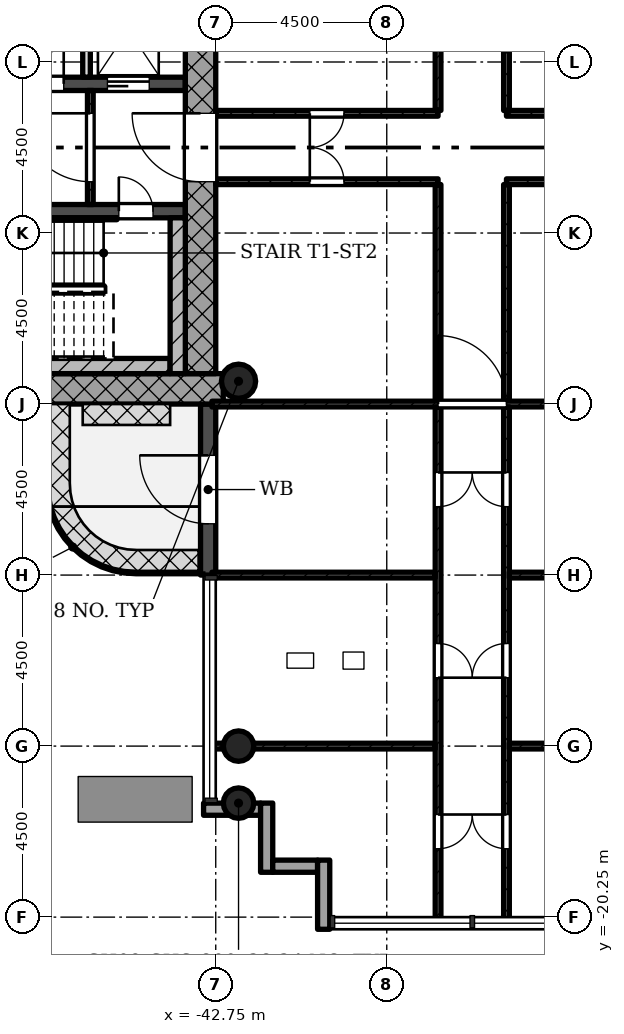
"""IFC4 building model, lengths in metres.
Left out: names, types, materials, properties, quantities, classifications, styles, units other than length and angle.
Written with IfcOpenShell. Run it as: python <this file> out.ifc"""

import sys

from ifc_helpers import new_model, si_unit, direction, frame, frame_2d, origin, origin_2d, place, context, subcontext, project, spatial, rectangle, hollow_circle, extrude, element, fill, save


model = new_model("IFC4")
c1 = context("Model", 3, precision=1e-05, world=origin(), true_north=direction((0.0, 1.0)))
c2 = subcontext(c1, "Body", "Model", "MODEL_VIEW")
j1 = project(units=[si_unit("LENGTHUNIT", "METRE"), si_unit("PLANEANGLEUNIT", "RADIAN")], contexts=[c1])
p1 = place(None, origin())
s1 = spatial("IfcSite", under=j1, at=p1, CompositionType="ELEMENT")
p2 = place(p1, origin())
s2 = spatial("IfcBuilding", under=s1, at=p2, CompositionType="ELEMENT")
p3 = place(p2, frame((0.0, 0.0, 181.3)))
s3 = spatial("IfcBuildingStorey", under=s2, at=p3, CompositionType="ELEMENT", Elevation=181.3)
p4 = place(p3, frame((-50.95, -6.35, 0.0), z_axis=(0.0, 0.0, 1.0), x_axis=(1.0, 0.0, 0.0)))
e1 = element("IfcWall", 1, at=p4, inside=s3, PredefinedType="SHEAR", context=c2, shape_type="SweptSolid", body=[
    extrude(rectangle(XDim=8.398, YDim=0.8, at=frame_2d((4.199, 0.0))), origin(), (0.0, 0.0, 1.0), 4.5),
])
p5 = place(p3, frame((-43.15, -5.95, 0.0), z_axis=(0.0, 0.0, 1.0), x_axis=(0.0, 1.0, 0.0)))
e2 = element("IfcWall", 2, at=p5, inside=s3, PredefinedType="SHEAR", context=c2, shape_type="SweptSolid", body=[
    extrude(rectangle(XDim=12.7, YDim=0.8, at=frame_2d((6.35, 0.0))), origin(), (0.0, 0.0, 1.0), 4.5),
])
p6 = place(p5, frame((5.05, 0.0, 0.0)))
e3 = element("IfcOpeningElement", 3, at=p6, cuts=e2, PredefinedType="OPENING", context=c2, shape_type="SweptSolid", body=[
    extrude(rectangle(XDim=1.8, YDim=2.1, at=frame_2d((0.9, 1.05))), frame((0.0, 0.41, 0.0), z_axis=(0.0, -1.0, 0.0), x_axis=(1.0, 0.0, 0.0)), (0.0, 0.0, 1.0), 0.82),
])
p7 = place(p3, frame((-50.95, -1.675, 0.0), z_axis=(0.0, 0.0, 1.0), x_axis=(1.0, 0.0, 0.0)))
e4 = element("IfcWall", 4, at=p7, inside=s3, PredefinedType="SHEAR", context=c2, shape_type="SweptSolid", body=[
    extrude(rectangle(XDim=7.4, YDim=0.35, at=frame_2d((3.7, 0.0))), origin(), (0.0, 0.0, 1.0), 4.5),
])
p8 = place(p7, frame((5.65, 0.0, 0.0)))
e5 = element("IfcOpeningElement", 5, at=p8, cuts=e4, PredefinedType="OPENING", context=c2, shape_type="SweptSolid", body=[
    extrude(rectangle(XDim=0.9, YDim=2.1, at=frame_2d((0.45, 1.05))), frame((0.0, 0.185, 0.0), z_axis=(0.0, -1.0, 0.0), x_axis=(1.0, 0.0, 0.0)), (0.0, 0.0, 1.0), 0.37),
])
p9 = place(p3, frame((-50.95, 1.675, 0.0), z_axis=(0.0, 0.0, 1.0), x_axis=(1.0, 0.0, 0.0)))
e6 = element("IfcWall", 6, at=p9, inside=s3, PredefinedType="SHEAR", context=c2, shape_type="SweptSolid", body=[
    extrude(rectangle(XDim=7.4, YDim=0.35, at=frame_2d((3.7, 0.0))), origin(), (0.0, 0.0, 1.0), 4.5),
])
p10 = place(p9, frame((5.35, 0.0, 0.0)))
e7 = element("IfcOpeningElement", 7, at=p10, cuts=e6, PredefinedType="OPENING", context=c2, shape_type="SweptSolid", body=[
    extrude(rectangle(XDim=1.1, YDim=2.1, at=frame_2d((0.55, 1.05))), frame((0.0, 0.185, 0.0), z_axis=(0.0, -1.0, 0.0), x_axis=(1.0, 0.0, 0.0)), (0.0, 0.0, 1.0), 0.37),
])
p11 = place(p9, frame((1.0, 0.0, 0.0)))
e8 = element("IfcOpeningElement", 8, at=p11, cuts=e6, PredefinedType="OPENING", context=c2, shape_type="SweptSolid", body=[
    extrude(rectangle(XDim=1.1, YDim=2.1, at=frame_2d((0.55, 1.05))), frame((0.0, 0.185, 0.0), z_axis=(0.0, -1.0, 0.0), x_axis=(1.0, 0.0, 0.0)), (0.0, 0.0, 1.0), 0.37),
])
p12 = place(p9, frame((3.3, 0.0, 0.0)))
e9 = element("IfcOpeningElement", 9, at=p12, cuts=e6, PredefinedType="OPENING", context=c2, shape_type="SweptSolid", body=[
    extrude(rectangle(XDim=0.9, YDim=2.1, at=frame_2d((0.45, 1.05))), frame((0.0, 0.185, 0.0), z_axis=(0.0, -1.0, 0.0), x_axis=(1.0, 0.0, 0.0)), (0.0, 0.0, 1.0), 0.37),
])
for number, where, z_axis, x_axis in (
    (10, (-42.15, -15.75, 0.0), (0.0, 0.0, 1.0), (1.0, 0.0, 0.0)),
    (11, (-42.15, -17.25, 0.0), (0.0, 0.0, 1.0), (1.0, 0.0, 0.0)),
):
    element("IfcColumn", number, at=place(p3, frame(where, z_axis=z_axis, x_axis=x_axis)), inside=s3, PredefinedType="COLUMN", context=c2, shape_type="SweptSolid", body=[
        extrude(hollow_circle(Radius=0.4, WallThickness=0.028, at=origin_2d()), origin(), (0.0, 0.0, 1.0), 4.5),
    ])
p13 = place(p3, frame((-42.15, -6.15, 0.0), z_axis=(0.0, 0.0, 1.0), x_axis=(1.0, 0.0, 0.0)))
e12 = element("IfcColumn", 12, at=p13, inside=s3, PredefinedType="COLUMN", context=c2, shape_type="SweptSolid", body=[
    extrude(hollow_circle(Radius=0.45, WallThickness=0.032, at=origin_2d()), origin(), (0.0, 0.0, 1.0), 4.5),
])
p14 = place(p3, frame((-42.95, -6.75, -0.02), z_axis=(0.0, 0.0, 1.0), x_axis=(0.0, -1.0, 0.0)))
e13 = element("IfcWall", 13, at=p14, inside=s3, PredefinedType="STANDARD", context=c2, shape_type="SweptSolid", body=[
    extrude(rectangle(XDim=4.5, YDim=0.4, at=frame_2d((2.25, 0.0))), origin(), (0.0, 0.0, 1.0), 4.22),
])
p15 = place(p14, frame((1.35, 0.0, 0.02)))
e14 = element("IfcOpeningElement", 14, at=p15, cuts=e13, PredefinedType="OPENING", context=c2, shape_type="SweptSolid", body=[
    extrude(rectangle(XDim=1.8, YDim=2.1, at=frame_2d((0.9, 1.05))), frame((0.0, 0.21, 0.0), z_axis=(0.0, -1.0, 0.0), x_axis=(1.0, 0.0, 0.0)), (0.0, 0.0, 1.0), 0.42),
])
p16 = place(p3, frame((-43.07, -17.41, -0.3), z_axis=(0.0, 0.0, 1.0), x_axis=(1.0, 0.0, 0.0)))
e15 = element("IfcWall", 15, at=p16, inside=s3, PredefinedType="STANDARD", context=c2, shape_type="SweptSolid", body=[
    extrude(rectangle(XDim=1.5, YDim=0.32, at=frame_2d((0.75, 0.0))), origin(), (0.0, 0.0, 1.0), 4.5),
])
p17 = place(p3, frame((-41.41, -17.25, -0.3), z_axis=(0.0, 0.0, 1.0), x_axis=(0.0, -1.0, 0.0)))
e16 = element("IfcWall", 16, at=p17, inside=s3, PredefinedType="STANDARD", context=c2, shape_type="SweptSolid", body=[
    extrude(rectangle(XDim=1.82, YDim=0.32, at=frame_2d((0.91, 0.0))), origin(), (0.0, 0.0, 1.0), 4.5),
])
p18 = place(p3, frame((-41.25, -18.91, -0.3), z_axis=(0.0, 0.0, 1.0), x_axis=(1.0, 0.0, 0.0)))
e17 = element("IfcWall", 17, at=p18, inside=s3, PredefinedType="STANDARD", context=c2, shape_type="SweptSolid", body=[
    extrude(rectangle(XDim=1.18, YDim=0.32, at=frame_2d((0.59, 0.0))), origin(), (0.0, 0.0, 1.0), 4.5),
])
p19 = place(p3, frame((-39.91, -18.75, -0.3), z_axis=(0.0, 0.0, 1.0), x_axis=(0.0, -1.0, 0.0)))
e18 = element("IfcWall", 18, at=p19, inside=s3, PredefinedType="STANDARD", context=c2, shape_type="SweptSolid", body=[
    extrude(rectangle(XDim=1.82, YDim=0.32, at=frame_2d((0.91, 0.0))), origin(), (0.0, 0.0, 1.0), 4.5),
])
p20 = place(p3, frame((-46.05, 1.5, 0.0), z_axis=(0.0, 0.0, 1.0), x_axis=(0.0, -1.0, 0.0)))
e19 = element("IfcWall", 19, at=p20, inside=s3, PredefinedType="PARTITIONING", context=c2, shape_type="SweptSolid", body=[
    extrude(rectangle(XDim=3.0, YDim=0.15, at=frame_2d((1.5, 0.0))), origin(), (0.0, 0.0, 1.0), 4.08),
])
p21 = place(p20, frame((0.6, 0.0, 0.0)))
e20 = element("IfcOpeningElement", 20, at=p21, cuts=e19, PredefinedType="OPENING", context=c2, shape_type="SweptSolid", body=[
    extrude(rectangle(XDim=1.8, YDim=2.1, at=frame_2d((0.9, 1.05))), frame((0.0, 0.085, 0.0), z_axis=(0.0, -1.0, 0.0), x_axis=(1.0, 0.0, 0.0)), (0.0, 0.0, 1.0), 0.17),
])
p22 = place(p3, frame((-46.15, 5.95, 0.0), z_axis=(0.0, 0.0, 1.0), x_axis=(0.0, -1.0, 0.0)))
e21 = element("IfcWall", 21, at=p22, inside=s3, PredefinedType="SOLIDWALL", context=c2, shape_type="SweptSolid", body=[
    extrude(rectangle(XDim=4.1, YDim=0.2, at=frame_2d((2.05, 0.0))), origin(), (0.0, 0.0, 1.0), 4.08),
])
p23 = place(p3, frame((-35.1, 0.9, 0.0), z_axis=(0.0, 0.0, 1.0), x_axis=(1.0, 0.0, 0.0)))
e22 = element("IfcWall", 22, at=p23, inside=s3, PredefinedType="PARTITIONING", context=c2, shape_type="SweptSolid", body=[
    extrude(rectangle(XDim=5.85, YDim=0.15, at=frame_2d((2.925, 0.0))), origin(), (0.0, 0.0, 1.0), 4.08),
])
p24 = place(p23, frame((2.475, 0.0, 0.0)))
e23 = element("IfcOpeningElement", 23, at=p24, cuts=e22, PredefinedType="OPENING", context=c2, shape_type="SweptSolid", body=[
    extrude(rectangle(XDim=0.9, YDim=2.1, at=frame_2d((0.45, 1.05))), frame((0.0, 0.085, 0.0), z_axis=(0.0, -1.0, 0.0), x_axis=(1.0, 0.0, 0.0)), (0.0, 0.0, 1.0), 0.17),
])
p25 = place(p3, frame((-35.1, 0.975, 0.0), z_axis=(0.0, 0.0, 1.0), x_axis=(0.0, 1.0, 0.0)))
e24 = element("IfcWall", 24, at=p25, inside=s3, PredefinedType="PARTITIONING", context=c2, shape_type="SweptSolid", body=[
    extrude(rectangle(XDim=5.7, YDim=0.15, at=frame_2d((2.85, 0.0))), origin(), (0.0, 0.0, 1.0), 4.08),
])
p26 = place(p3, frame((-35.1, -0.9, 0.0), z_axis=(0.0, 0.0, 1.0), x_axis=(1.0, 0.0, 0.0)))
e25 = element("IfcWall", 25, at=p26, inside=s3, PredefinedType="PARTITIONING", context=c2, shape_type="SweptSolid", body=[
    extrude(rectangle(XDim=5.85, YDim=0.15, at=frame_2d((2.925, 0.0))), origin(), (0.0, 0.0, 1.0), 4.08),
])
p27 = place(p26, frame((2.475, 0.0, 0.0)))
e26 = element("IfcOpeningElement", 26, at=p27, cuts=e25, PredefinedType="OPENING", context=c2, shape_type="SweptSolid", body=[
    extrude(rectangle(XDim=0.9, YDim=2.1, at=frame_2d((0.45, 1.05))), frame((0.0, 0.085, 0.0), z_axis=(0.0, -1.0, 0.0), x_axis=(1.0, 0.0, 0.0)), (0.0, 0.0, 1.0), 0.17),
])
p28 = place(p3, frame((-35.1, -6.675, 0.0), z_axis=(0.0, 0.0, 1.0), x_axis=(0.0, 1.0, 0.0)))
e27 = element("IfcWall", 27, at=p28, inside=s3, PredefinedType="PARTITIONING", context=c2, shape_type="SweptSolid", body=[
    extrude(rectangle(XDim=5.7, YDim=0.15, at=frame_2d((2.85, 0.0))), origin(), (0.0, 0.0, 1.0), 4.08),
])
p29 = place(p3, frame((-42.75, 0.9, 0.0), z_axis=(0.0, 0.0, 1.0), x_axis=(1.0, 0.0, 0.0)))
e28 = element("IfcWall", 28, at=p29, inside=s3, PredefinedType="PARTITIONING", context=c2, shape_type="SweptSolid", body=[
    extrude(rectangle(XDim=5.85, YDim=0.15, at=frame_2d((2.925, 0.0))), origin(), (0.0, 0.0, 1.0), 4.08),
])
p30 = place(p29, frame((2.475, 0.0, 0.0)))
e29 = element("IfcOpeningElement", 29, at=p30, cuts=e28, PredefinedType="OPENING", context=c2, shape_type="SweptSolid", body=[
    extrude(rectangle(XDim=0.9, YDim=2.1, at=frame_2d((0.45, 1.05))), frame((0.0, 0.085, 0.0), z_axis=(0.0, -1.0, 0.0), x_axis=(1.0, 0.0, 0.0)), (0.0, 0.0, 1.0), 0.17),
])
p31 = place(p3, frame((-36.9, 0.975, 0.0), z_axis=(0.0, 0.0, 1.0), x_axis=(0.0, 1.0, 0.0)))
e30 = element("IfcWall", 30, at=p31, inside=s3, PredefinedType="PARTITIONING", context=c2, shape_type="SweptSolid", body=[
    extrude(rectangle(XDim=5.7, YDim=0.15, at=frame_2d((2.85, 0.0))), origin(), (0.0, 0.0, 1.0), 4.08),
])
p32 = place(p3, frame((-42.75, -0.9, 0.0), z_axis=(0.0, 0.0, 1.0), x_axis=(1.0, 0.0, 0.0)))
e31 = element("IfcWall", 31, at=p32, inside=s3, PredefinedType="PARTITIONING", context=c2, shape_type="SweptSolid", body=[
    extrude(rectangle(XDim=5.85, YDim=0.15, at=frame_2d((2.925, 0.0))), origin(), (0.0, 0.0, 1.0), 4.08),
])
p33 = place(p32, frame((2.475, 0.0, 0.0)))
e32 = element("IfcOpeningElement", 32, at=p33, cuts=e31, PredefinedType="OPENING", context=c2, shape_type="SweptSolid", body=[
    extrude(rectangle(XDim=0.9, YDim=2.1, at=frame_2d((0.45, 1.05))), frame((0.0, 0.085, 0.0), z_axis=(0.0, -1.0, 0.0), x_axis=(1.0, 0.0, 0.0)), (0.0, 0.0, 1.0), 0.17),
])
p34 = place(p3, frame((-36.9, -6.675, 0.0), z_axis=(0.0, 0.0, 1.0), x_axis=(0.0, 1.0, 0.0)))
e33 = element("IfcWall", 33, at=p34, inside=s3, PredefinedType="PARTITIONING", context=c2, shape_type="SweptSolid", body=[
    extrude(rectangle(XDim=5.7, YDim=0.15, at=frame_2d((2.85, 0.0))), origin(), (0.0, 0.0, 1.0), 4.08),
])
p35 = place(p3, frame((-42.85, -6.75, 0.0), z_axis=(0.0, 0.0, 1.0), x_axis=(1.0, 0.0, 0.0)))
e34 = element("IfcWall", 34, at=p35, inside=s3, PredefinedType="PARTITIONING", context=c2, shape_type="SweptSolid", body=[
    extrude(rectangle(XDim=13.7, YDim=0.15, at=frame_2d((6.85, 0.0))), origin(), (0.0, 0.0, 1.0), 4.08),
])
p36 = place(p35, frame((5.95, 0.0, 0.0)))
e35 = element("IfcOpeningElement", 35, at=p36, cuts=e34, PredefinedType="OPENING", context=c2, shape_type="SweptSolid", body=[
    extrude(rectangle(XDim=1.8, YDim=2.1, at=frame_2d((0.9, 1.05))), frame((0.0, 0.085, 0.0), z_axis=(0.0, -1.0, 0.0), x_axis=(1.0, 0.0, 0.0)), (0.0, 0.0, 1.0), 0.17),
])
p37 = place(p3, frame((-35.1, -20.35, 0.0), z_axis=(0.0, 0.0, 1.0), x_axis=(0.0, 1.0, 0.0)))
e36 = element("IfcWall", 36, at=p37, inside=s3, PredefinedType="PARTITIONING", context=c2, shape_type="SweptSolid", body=[
    extrude(rectangle(XDim=13.525, YDim=0.15, at=frame_2d((6.763, 0.0))), origin(), (0.0, 0.0, 1.0), 4.08),
])
p38 = place(p37, frame((1.9, 0.0, 0.0)))
e37 = element("IfcOpeningElement", 37, at=p38, cuts=e36, PredefinedType="OPENING", context=c2, shape_type="SweptSolid", body=[
    extrude(rectangle(XDim=0.9, YDim=2.1, at=frame_2d((0.45, 1.05))), frame((0.0, 0.085, 0.0), z_axis=(0.0, -1.0, 0.0), x_axis=(1.0, 0.0, 0.0)), (0.0, 0.0, 1.0), 0.17),
])
p39 = place(p37, frame((6.4, 0.0, 0.0)))
e38 = element("IfcOpeningElement", 38, at=p39, cuts=e36, PredefinedType="OPENING", context=c2, shape_type="SweptSolid", body=[
    extrude(rectangle(XDim=0.9, YDim=2.1, at=frame_2d((0.45, 1.05))), frame((0.0, 0.085, 0.0), z_axis=(0.0, -1.0, 0.0), x_axis=(1.0, 0.0, 0.0)), (0.0, 0.0, 1.0), 0.17),
])
p40 = place(p37, frame((10.9, 0.0, 0.0)))
e39 = element("IfcOpeningElement", 39, at=p40, cuts=e36, PredefinedType="OPENING", context=c2, shape_type="SweptSolid", body=[
    extrude(rectangle(XDim=0.9, YDim=2.1, at=frame_2d((0.45, 1.05))), frame((0.0, 0.085, 0.0), z_axis=(0.0, -1.0, 0.0), x_axis=(1.0, 0.0, 0.0)), (0.0, 0.0, 1.0), 0.17),
])
for number, where, z_axis, x_axis in (
    (40, (-35.025, -15.75, 0.0), (0.0, 0.0, 1.0), (1.0, 0.0, 0.0)),
    (41, (-35.025, -11.25, 0.0), (0.0, 0.0, 1.0), (1.0, 0.0, 0.0)),
):
    element("IfcWall", number, at=place(p3, frame(where, z_axis=z_axis, x_axis=x_axis)), inside=s3, PredefinedType="PARTITIONING", context=c2, shape_type="SweptSolid", body=[
        extrude(rectangle(XDim=5.875, YDim=0.15, at=frame_2d((2.938, 0.0))), origin(), (0.0, 0.0, 1.0), 4.08),
    ])
p41 = place(p3, frame((-36.9, -20.35, 0.0), z_axis=(0.0, 0.0, 1.0), x_axis=(0.0, 1.0, 0.0)))
e42 = element("IfcWall", 42, at=p41, inside=s3, PredefinedType="PARTITIONING", context=c2, shape_type="SweptSolid", body=[
    extrude(rectangle(XDim=13.525, YDim=0.15, at=frame_2d((6.763, 0.0))), origin(), (0.0, 0.0, 1.0), 4.08),
])
p42 = place(p41, frame((1.9, 0.0, 0.0)))
e43 = element("IfcOpeningElement", 43, at=p42, cuts=e42, PredefinedType="OPENING", context=c2, shape_type="SweptSolid", body=[
    extrude(rectangle(XDim=0.9, YDim=2.1, at=frame_2d((0.45, 1.05))), frame((0.0, 0.085, 0.0), z_axis=(0.0, -1.0, 0.0), x_axis=(1.0, 0.0, 0.0)), (0.0, 0.0, 1.0), 0.17),
])
p43 = place(p41, frame((6.4, 0.0, 0.0)))
e44 = element("IfcOpeningElement", 44, at=p43, cuts=e42, PredefinedType="OPENING", context=c2, shape_type="SweptSolid", body=[
    extrude(rectangle(XDim=0.9, YDim=2.1, at=frame_2d((0.45, 1.05))), frame((0.0, 0.085, 0.0), z_axis=(0.0, -1.0, 0.0), x_axis=(1.0, 0.0, 0.0)), (0.0, 0.0, 1.0), 0.17),
])
p44 = place(p41, frame((10.9, 0.0, 0.0)))
e45 = element("IfcOpeningElement", 45, at=p44, cuts=e42, PredefinedType="OPENING", context=c2, shape_type="SweptSolid", body=[
    extrude(rectangle(XDim=0.9, YDim=2.1, at=frame_2d((0.45, 1.05))), frame((0.0, 0.085, 0.0), z_axis=(0.0, -1.0, 0.0), x_axis=(1.0, 0.0, 0.0)), (0.0, 0.0, 1.0), 0.17),
])
for number, where, z_axis, x_axis in (
    (46, (-36.975, -15.75, 0.0), (0.0, 0.0, 1.0), (-1.0, 0.0, 0.0)),
    (47, (-36.975, -11.25, 0.0), (0.0, 0.0, 1.0), (-1.0, 0.0, 0.0)),
):
    element("IfcWall", number, at=place(p3, frame(where, z_axis=z_axis, x_axis=x_axis)), inside=s3, PredefinedType="PARTITIONING", context=c2, shape_type="SweptSolid", body=[
        extrude(rectangle(XDim=5.875, YDim=0.15, at=frame_2d((2.938, 0.0))), origin(), (0.0, 0.0, 1.0), 4.08),
    ])
p45 = place(p3, frame((-43.95, -5.75, 0.0), z_axis=(0.0, 0.0, 1.0), x_axis=(-1.0, 0.0, 0.0)))
e48 = element("IfcWall", 48, at=p45, inside=s3, PredefinedType="SHEAR", context=c2, shape_type="SweptSolid", body=[
    extrude(rectangle(XDim=6.6, YDim=0.4, at=frame_2d((3.3, 0.0))), origin(), (0.0, 0.0, 1.0), 4.5),
])
p46 = place(p3, frame((-43.75, -1.85, 0.0), z_axis=(0.0, 0.0, 1.0), x_axis=(0.0, -1.0, 0.0)))
e49 = element("IfcWall", 49, at=p46, inside=s3, PredefinedType="SHEAR", context=c2, shape_type="SweptSolid", body=[
    extrude(rectangle(XDim=4.1, YDim=0.4, at=frame_2d((2.05, 0.0))), origin(), (0.0, 0.0, 1.0), 4.5),
])
p47 = place(p3, frame((-45.35, -1.875, 0.0), z_axis=(0.0, 0.0, 1.0), x_axis=(-1.0, 0.0, 0.0)))
e50 = element("IfcWall", 50, at=p47, inside=s3, PredefinedType="SHEAR", context=c2, shape_type="SweptSolid", body=[
    extrude(rectangle(XDim=5.2, YDim=0.05, at=frame_2d((2.6, 0.0))), origin(), (0.0, 0.0, 1.0), 4.5),
])
p48 = place(p15, origin())
e51 = element("IfcDoor", 51, at=p48, inside=s3, OperationType="SINGLE_SWING_LEFT", PredefinedType="DOOR", context=c2, shape_type="SweptSolid", body=[
    extrude(rectangle(XDim=1.8, YDim=2.1, at=frame_2d((0.9, 1.05))), frame((0.0, 0.025, 0.0), z_axis=(0.0, -1.0, 0.0), x_axis=(1.0, 0.0, 0.0)), (0.0, 0.0, 1.0), 0.05),
])
fill(e14, e51)
p49 = place(p21, origin())
e52 = element("IfcDoor", 52, at=p49, inside=s3, OperationType="SINGLE_SWING_LEFT", PredefinedType="DOOR", context=c2, shape_type="SweptSolid", body=[
    extrude(rectangle(XDim=1.8, YDim=2.1, at=frame_2d((0.9, 1.05))), frame((0.0, 0.025, 0.0), z_axis=(0.0, -1.0, 0.0), x_axis=(1.0, 0.0, 0.0)), (0.0, 0.0, 1.0), 0.05),
])
fill(e20, e52)
p50 = place(p30, origin())
e53 = element("IfcDoor", 53, at=p50, inside=s3, OperationType="SINGLE_SWING_LEFT", PredefinedType="DOOR", context=c2, shape_type="SweptSolid", body=[
    extrude(rectangle(XDim=0.9, YDim=2.1, at=frame_2d((0.45, 1.05))), frame((0.0, 0.025, 0.0), z_axis=(0.0, -1.0, 0.0), x_axis=(1.0, 0.0, 0.0)), (0.0, 0.0, 1.0), 0.05),
])
fill(e29, e53)
p51 = place(p33, origin())
e54 = element("IfcDoor", 54, at=p51, inside=s3, OperationType="SINGLE_SWING_RIGHT", PredefinedType="DOOR", context=c2, shape_type="SweptSolid", body=[
    extrude(rectangle(XDim=0.9, YDim=2.1, at=frame_2d((0.45, 1.05))), frame((0.0, 0.025, 0.0), z_axis=(0.0, -1.0, 0.0), x_axis=(1.0, 0.0, 0.0)), (0.0, 0.0, 1.0), 0.05),
])
fill(e32, e54)
p52 = place(p36, origin())
e55 = element("IfcDoor", 55, at=p52, inside=s3, OperationType="SINGLE_SWING_RIGHT", PredefinedType="DOOR", context=c2, shape_type="SweptSolid", body=[
    extrude(rectangle(XDim=1.8, YDim=2.1, at=frame_2d((0.9, 1.05))), frame((0.0, 0.025, 0.0), z_axis=(0.0, -1.0, 0.0), x_axis=(1.0, 0.0, 0.0)), (0.0, 0.0, 1.0), 0.05),
])
fill(e35, e55)
p53 = place(p38, origin())
e56 = element("IfcDoor", 56, at=p53, inside=s3, OperationType="SINGLE_SWING_LEFT", PredefinedType="DOOR", context=c2, shape_type="SweptSolid", body=[
    extrude(rectangle(XDim=0.9, YDim=2.1, at=frame_2d((0.45, 1.05))), frame((0.0, 0.025, 0.0), z_axis=(0.0, -1.0, 0.0), x_axis=(1.0, 0.0, 0.0)), (0.0, 0.0, 1.0), 0.05),
])
fill(e37, e56)
p54 = place(p39, origin())
e57 = element("IfcDoor", 57, at=p54, inside=s3, OperationType="SINGLE_SWING_RIGHT", PredefinedType="DOOR", context=c2, shape_type="SweptSolid", body=[
    extrude(rectangle(XDim=0.9, YDim=2.1, at=frame_2d((0.45, 1.05))), frame((0.0, 0.025, 0.0), z_axis=(0.0, -1.0, 0.0), x_axis=(1.0, 0.0, 0.0)), (0.0, 0.0, 1.0), 0.05),
])
fill(e38, e57)
p55 = place(p40, origin())
e58 = element("IfcDoor", 58, at=p55, inside=s3, OperationType="SINGLE_SWING_LEFT", PredefinedType="DOOR", context=c2, shape_type="SweptSolid", body=[
    extrude(rectangle(XDim=0.9, YDim=2.1, at=frame_2d((0.45, 1.05))), frame((0.0, 0.025, 0.0), z_axis=(0.0, -1.0, 0.0), x_axis=(1.0, 0.0, 0.0)), (0.0, 0.0, 1.0), 0.05),
])
fill(e39, e58)
p56 = place(p42, origin())
e59 = element("IfcDoor", 59, at=p56, inside=s3, OperationType="SINGLE_SWING_RIGHT", PredefinedType="DOOR", context=c2, shape_type="SweptSolid", body=[
    extrude(rectangle(XDim=0.9, YDim=2.1, at=frame_2d((0.45, 1.05))), frame((0.0, 0.025, 0.0), z_axis=(0.0, -1.0, 0.0), x_axis=(1.0, 0.0, 0.0)), (0.0, 0.0, 1.0), 0.05),
])
fill(e43, e59)
p57 = place(p43, origin())
e60 = element("IfcDoor", 60, at=p57, inside=s3, OperationType="SINGLE_SWING_LEFT", PredefinedType="DOOR", context=c2, shape_type="SweptSolid", body=[
    extrude(rectangle(XDim=0.9, YDim=2.1, at=frame_2d((0.45, 1.05))), frame((0.0, 0.025, 0.0), z_axis=(0.0, -1.0, 0.0), x_axis=(1.0, 0.0, 0.0)), (0.0, 0.0, 1.0), 0.05),
])
fill(e44, e60)
p58 = place(p44, origin())
e61 = element("IfcDoor", 61, at=p58, inside=s3, OperationType="SINGLE_SWING_RIGHT", PredefinedType="DOOR", context=c2, shape_type="SweptSolid", body=[
    extrude(rectangle(XDim=0.9, YDim=2.1, at=frame_2d((0.45, 1.05))), frame((0.0, 0.025, 0.0), z_axis=(0.0, -1.0, 0.0), x_axis=(1.0, 0.0, 0.0)), (0.0, 0.0, 1.0), 0.05),
])
fill(e45, e61)
p59 = place(p8, origin())
e62 = element("IfcDoor", 62, at=p59, inside=s3, OperationType="SINGLE_SWING_RIGHT", PredefinedType="DOOR", context=c2, shape_type="SweptSolid", body=[
    extrude(rectangle(XDim=0.9, YDim=2.1, at=frame_2d((0.45, 1.05))), frame((0.0, 0.025, 0.0), z_axis=(0.0, -1.0, 0.0), x_axis=(1.0, 0.0, 0.0)), (0.0, 0.0, 1.0), 0.05),
])
fill(e5, e62)
p60 = place(p10, origin())
e63 = element("IfcDoor", 63, at=p60, inside=s3, OperationType="SLIDING_TO_LEFT", PredefinedType="DOOR", context=c2, shape_type="SweptSolid", body=[
    extrude(rectangle(XDim=1.1, YDim=2.1, at=frame_2d((0.55, 1.05))), frame((0.0, 0.025, 0.0), z_axis=(0.0, -1.0, 0.0), x_axis=(1.0, 0.0, 0.0)), (0.0, 0.0, 1.0), 0.05),
])
fill(e7, e63)
p61 = place(p12, origin())
e64 = element("IfcDoor", 64, at=p61, inside=s3, OperationType="SINGLE_SWING_LEFT", PredefinedType="DOOR", context=c2, shape_type="SweptSolid", body=[
    extrude(rectangle(XDim=0.9, YDim=2.1, at=frame_2d((0.45, 1.05))), frame((0.0, 0.025, 0.0), z_axis=(0.0, -1.0, 0.0), x_axis=(1.0, 0.0, 0.0)), (0.0, 0.0, 1.0), 0.05),
])
fill(e9, e64)
p62 = place(p6, origin())
e65 = element("IfcDoor", 65, at=p62, inside=s3, OperationType="SINGLE_SWING_LEFT", PredefinedType="DOOR", context=c2, shape_type="SweptSolid", body=[
    extrude(rectangle(XDim=1.8, YDim=2.1, at=frame_2d((0.9, 1.05))), frame((0.0, 0.025, 0.0), z_axis=(0.0, -1.0, 0.0), x_axis=(1.0, 0.0, 0.0)), (0.0, 0.0, 1.0), 0.05),
])
fill(e3, e65)
save(model, sys.argv[1])
